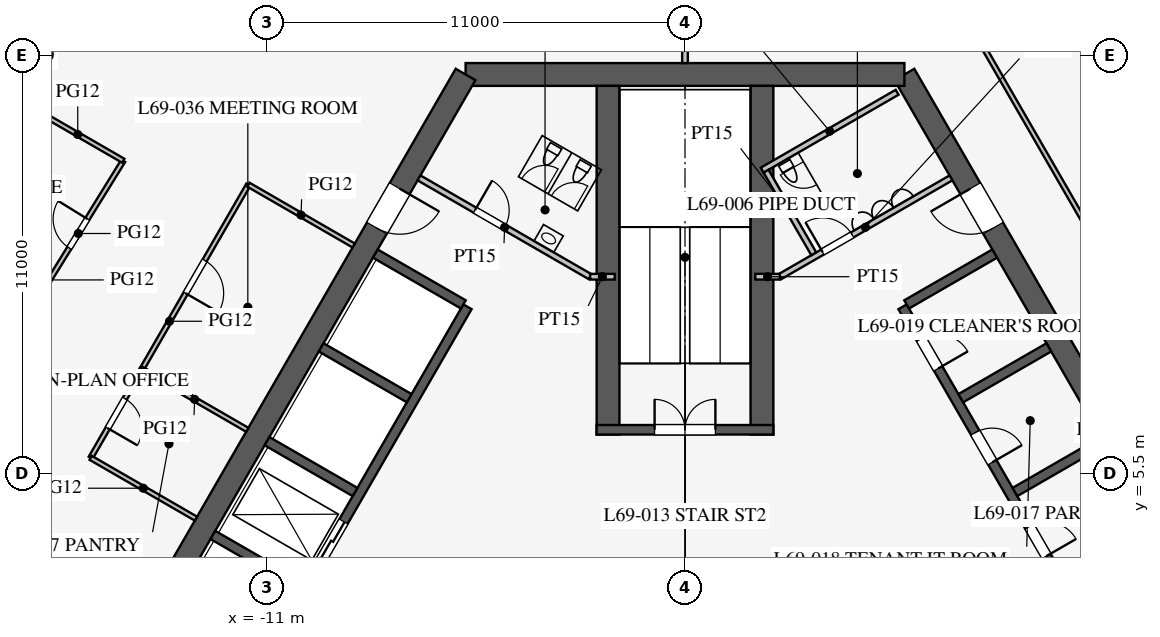
"""IFC4 building model, lengths in metres.
Left out: names, types, materials, properties, quantities, classifications, styles, units other than length and angle.
Written with IfcOpenShell. Run it as: python <this file> out.ifc"""

import sys

from ifc_helpers import new_model, si_unit, direction, frame, frame_2d, origin, place, context, subcontext, project, spatial, rectangle, extrude, element, fill, save


model = new_model("IFC4")
c1 = context("Model", 3, precision=1e-05, world=origin(), true_north=direction((0.0, 1.0)))
c2 = subcontext(c1, "Body", "Model", "MODEL_VIEW")
j1 = project(units=[si_unit("LENGTHUNIT", "METRE"), si_unit("PLANEANGLEUNIT", "RADIAN")], contexts=[c1])
p1 = place(None, origin())
s1 = spatial("IfcSite", under=j1, at=p1, CompositionType="ELEMENT")
p2 = place(p1, origin())
s2 = spatial("IfcBuilding", under=s1, at=p2, CompositionType="ELEMENT")
p3 = place(p2, frame((0.0, 0.0, 301.5)))
s3 = spatial("IfcBuildingStorey", under=s2, at=p3, CompositionType="ELEMENT", Elevation=301.5)
p4 = place(p3, frame((16.743, -3.0, 0.0), z_axis=(0.0, 0.0, 1.0), x_axis=(-0.500002442456, 0.866023993627, 0.0)))
e1 = element("IfcWall", 1, at=p4, inside=s3, PredefinedType="SHEAR", context=c2, shape_type="SweptSolid", body=[
    extrude(rectangle(XDim=21.939, YDim=0.6, at=frame_2d((10.97, 0.0))), origin(), (0.0, 0.0, 1.0), 4.2),
])
p5 = place(p4, frame((17.27, 0.0, 0.0)))
e2 = element("IfcOpeningElement", 2, at=p5, cuts=e1, PredefinedType="OPENING", context=c2, shape_type="SweptSolid", body=[
    extrude(rectangle(XDim=1.2, YDim=2.1, at=frame_2d((0.6, 1.05))), frame((0.0, 0.31, 0.0), z_axis=(0.0, -1.0, 0.0), x_axis=(1.0, 0.0, 0.0)), (0.0, 0.0, 1.0), 0.62),
])
p6 = place(p4, frame((3.47, 0.0, 0.0)))
e3 = element("IfcOpeningElement", 3, at=p6, cuts=e1, PredefinedType="OPENING", context=c2, shape_type="SweptSolid", body=[
    extrude(rectangle(XDim=1.2, YDim=2.1, at=frame_2d((0.6, 1.05))), frame((0.0, 0.31, 0.0), z_axis=(0.0, -1.0, 0.0), x_axis=(1.0, 0.0, 0.0)), (0.0, 0.0, 1.0), 0.62),
])
p7 = place(p3, frame((5.773, 16.0, 0.0), z_axis=(0.0, 0.0, 1.0), x_axis=(-1.0, 0.0, 0.0)))
e4 = element("IfcWall", 4, at=p7, inside=s3, PredefinedType="SHEAR", context=c2, shape_type="SweptSolid", body=[
    extrude(rectangle(XDim=11.547, YDim=0.6, at=frame_2d((5.773, 0.0))), origin(), (0.0, 0.0, 1.0), 4.2),
])
p8 = place(p3, frame((-5.773, 16.0, 0.0), z_axis=(0.0, 0.0, 1.0), x_axis=(-0.500002442456, -0.866023993627, 0.0)))
e5 = element("IfcWall", 5, at=p8, inside=s3, PredefinedType="SHEAR", context=c2, shape_type="SweptSolid", body=[
    extrude(rectangle(XDim=21.939, YDim=0.6, at=frame_2d((10.97, 0.0))), origin(), (0.0, 0.0, 1.0), 4.2),
])
p9 = place(p8, frame((17.27, 0.0, 0.0)))
e6 = element("IfcOpeningElement", 6, at=p9, cuts=e5, PredefinedType="OPENING", context=c2, shape_type="SweptSolid", body=[
    extrude(rectangle(XDim=1.2, YDim=2.1, at=frame_2d((0.6, 1.05))), frame((0.0, 0.31, 0.0), z_axis=(0.0, -1.0, 0.0), x_axis=(1.0, 0.0, 0.0)), (0.0, 0.0, 1.0), 0.62),
])
p10 = place(p8, frame((3.47, 0.0, 0.0)))
e7 = element("IfcOpeningElement", 7, at=p10, cuts=e5, PredefinedType="OPENING", context=c2, shape_type="SweptSolid", body=[
    extrude(rectangle(XDim=1.2, YDim=2.1, at=frame_2d((0.6, 1.05))), frame((0.0, 0.31, 0.0), z_axis=(0.0, -1.0, 0.0), x_axis=(1.0, 0.0, 0.0)), (0.0, 0.0, 1.0), 0.62),
])
p11 = place(p3, frame((11.424, 0.014, 0.0), z_axis=(0.0, 0.0, 1.0), x_axis=(-0.500001763848, 0.866024385424, 0.0)))
e8 = element("IfcWall", 8, at=p11, inside=s3, PredefinedType="SHEAR", context=c2, shape_type="SweptSolid", body=[
    extrude(rectangle(XDim=11.4, YDim=0.25, at=frame_2d((5.7, 0.0))), origin(), (0.0, 0.0, 1.0), 4.2),
])
p12 = place(p11, frame((0.975, 0.0, 0.0)))
e9 = element("IfcOpeningElement", 9, at=p12, cuts=e8, PredefinedType="OPENING", context=c2, shape_type="SweptSolid", body=[
    extrude(rectangle(XDim=0.9, YDim=2.1, at=frame_2d((0.45, 1.05))), frame((0.0, 0.135, 0.0), z_axis=(0.0, -1.0, 0.0), x_axis=(1.0, 0.0, 0.0)), (0.0, 0.0, 1.0), 0.27),
])
p13 = place(p11, frame((3.825, 0.0, 0.0)))
e10 = element("IfcOpeningElement", 10, at=p13, cuts=e8, PredefinedType="OPENING", context=c2, shape_type="SweptSolid", body=[
    extrude(rectangle(XDim=0.9, YDim=2.1, at=frame_2d((0.45, 1.05))), frame((0.0, 0.135, 0.0), z_axis=(0.0, -1.0, 0.0), x_axis=(1.0, 0.0, 0.0)), (0.0, 0.0, 1.0), 0.27),
])
p14 = place(p11, frame((6.675, 0.0, 0.0)))
e11 = element("IfcOpeningElement", 11, at=p14, cuts=e8, PredefinedType="OPENING", context=c2, shape_type="SweptSolid", body=[
    extrude(rectangle(XDim=0.9, YDim=2.1, at=frame_2d((0.45, 1.05))), frame((0.0, 0.135, 0.0), z_axis=(0.0, -1.0, 0.0), x_axis=(1.0, 0.0, 0.0)), (0.0, 0.0, 1.0), 0.27),
])
p15 = place(p11, frame((9.525, 0.0, 0.0)))
e12 = element("IfcOpeningElement", 12, at=p15, cuts=e8, PredefinedType="OPENING", context=c2, shape_type="SweptSolid", body=[
    extrude(rectangle(XDim=0.9, YDim=2.1, at=frame_2d((0.45, 1.05))), frame((0.0, 0.135, 0.0), z_axis=(0.0, -1.0, 0.0), x_axis=(1.0, 0.0, 0.0)), (0.0, 0.0, 1.0), 0.27),
])
for number, where, z_axis, x_axis in (
    (13, (10.107, 2.544, 0.0), (0.0, 0.0, 1.0), (0.866, 0.5, 0.0)),
    (14, (8.682, 5.012, 0.0), (0.0, 0.0, 1.0), (0.866, 0.5, 0.0)),
    (15, (7.257, 7.481, 0.0), (0.0, 0.0, 1.0), (0.866, 0.5, 0.0)),
    (16, (5.832, 9.949, 0.0), (0.0, 0.0, 1.0), (0.866, 0.5, 0.0)),
):
    element("IfcWall", number, at=place(p3, frame(where, z_axis=z_axis, x_axis=x_axis)), inside=s3, PredefinedType="SHEAR", context=c2, shape_type="SweptSolid", body=[
        extrude(rectangle(XDim=2.675, YDim=0.25, at=frame_2d((1.337, 0.0))), origin(), (0.0, 0.0, 1.0), 4.2),
    ])
p16 = place(p3, frame((-5.724, 9.886, 0.0), z_axis=(0.0, 0.0, 1.0), x_axis=(-0.500001763848, -0.866024385424, 0.0)))
e17 = element("IfcWall", 17, at=p16, inside=s3, PredefinedType="SHEAR", context=c2, shape_type="SweptSolid", body=[
    extrude(rectangle(XDim=11.4, YDim=0.25, at=frame_2d((5.7, 0.0))), origin(), (0.0, 0.0, 1.0), 4.2),
])
p17 = place(p16, frame((6.525, 0.0, 0.0)))
e18 = element("IfcOpeningElement", 18, at=p17, cuts=e17, PredefinedType="OPENING", context=c2, shape_type="SweptSolid", body=[
    extrude(rectangle(XDim=1.2, YDim=2.2, at=frame_2d((0.6, 1.1))), frame((0.0, 0.135, 0.0), z_axis=(0.0, -1.0, 0.0), x_axis=(1.0, 0.0, 0.0)), (0.0, 0.0, 1.0), 0.27),
])
p18 = place(p16, frame((9.375, 0.0, 0.0)))
e19 = element("IfcOpeningElement", 19, at=p18, cuts=e17, PredefinedType="OPENING", context=c2, shape_type="SweptSolid", body=[
    extrude(rectangle(XDim=1.2, YDim=2.2, at=frame_2d((0.6, 1.1))), frame((0.0, 0.135, 0.0), z_axis=(0.0, -1.0, 0.0), x_axis=(1.0, 0.0, 0.0)), (0.0, 0.0, 1.0), 0.27),
])
for number, where, z_axis, x_axis in (
    (20, (-5.832, 9.949, 0.0), (0.0, 0.0, 1.0), (-0.866, 0.5, 0.0)),
    (21, (-7.257, 7.481, 0.0), (0.0, 0.0, 1.0), (-0.866, 0.5, 0.0)),
    (22, (-8.682, 5.012, 0.0), (0.0, 0.0, 1.0), (-0.866, 0.5, 0.0)),
    (23, (-10.107, 2.544, 0.0), (0.0, 0.0, 1.0), (-0.866, 0.5, 0.0)),
):
    element("IfcWall", number, at=place(p3, frame(where, z_axis=z_axis, x_axis=x_axis)), inside=s3, PredefinedType="SHEAR", context=c2, shape_type="SweptSolid", body=[
        extrude(rectangle(XDim=2.675, YDim=0.25, at=frame_2d((1.337, 0.0))), origin(), (0.0, 0.0, 1.0), 4.2),
    ])
for number, where, z_axis, x_axis in (
    (24, (2.025, 6.525, 0.0), (0.0, 0.0, 1.0), (0.0, 1.0, 0.0)),
    (25, (-2.025, 6.525, 0.0), (0.0, 0.0, 1.0), (0.0, 1.0, 0.0)),
):
    element("IfcWall", number, at=place(p3, frame(where, z_axis=z_axis, x_axis=x_axis)), inside=s3, PredefinedType="SHEAR", context=c2, shape_type="SweptSolid", body=[
        extrude(rectangle(XDim=9.175, YDim=0.6, at=frame_2d((4.587, 0.0))), origin(), (0.0, 0.0, 1.0), 4.2),
    ])
p19 = place(p3, frame((2.325, 6.65, 0.0), z_axis=(0.0, 0.0, 1.0), x_axis=(-1.0, 0.0, 0.0)))
e26 = element("IfcWall", 26, at=p19, inside=s3, PredefinedType="SHEAR", context=c2, shape_type="SweptSolid", body=[
    extrude(rectangle(XDim=4.65, YDim=0.25, at=frame_2d((2.325, 0.0))), origin(), (0.0, 0.0, 1.0), 4.2),
])
p20 = place(p19, frame((1.525, 0.0, 0.0)))
e27 = element("IfcOpeningElement", 27, at=p20, cuts=e26, PredefinedType="OPENING", context=c2, shape_type="SweptSolid", body=[
    extrude(rectangle(XDim=1.6, YDim=2.1, at=frame_2d((0.8, 1.05))), frame((0.0, 0.135, 0.0), z_axis=(0.0, -1.0, 0.0), x_axis=(1.0, 0.0, 0.0)), (0.0, 0.0, 1.0), 0.27),
])
p21 = place(p3, frame((2.495, 10.678, 0.0), z_axis=(0.0, 0.0, 1.0), x_axis=(0.866021400173, 0.500006934395, 0.0)))
e28 = element("IfcWall", 28, at=p21, inside=s3, PredefinedType="PARTITIONING", context=c2, shape_type="SweptSolid", body=[
    extrude(rectangle(XDim=5.2, YDim=0.15, at=frame_2d((2.6, 0.0))), origin(), (0.0, 0.0, 1.0), 4.0),
])
p22 = place(p21, frame((1.3, 0.0, 0.0)))
e29 = element("IfcOpeningElement", 29, at=p22, cuts=e28, PredefinedType="OPENING", context=c2, shape_type="SweptSolid", body=[
    extrude(rectangle(XDim=0.9, YDim=2.1, at=frame_2d((0.45, 1.05))), frame((0.0, 0.085, 0.0), z_axis=(0.0, -1.0, 0.0), x_axis=(1.0, 0.0, 0.0)), (0.0, 0.0, 1.0), 0.17),
])
p23 = place(p3, frame((-2.495, 10.678, 0.0), z_axis=(0.0, 0.0, 1.0), x_axis=(-0.866021400173, 0.500006934395, 0.0)))
e30 = element("IfcWall", 30, at=p23, inside=s3, PredefinedType="PARTITIONING", context=c2, shape_type="SweptSolid", body=[
    extrude(rectangle(XDim=5.2, YDim=0.15, at=frame_2d((2.6, 0.0))), origin(), (0.0, 0.0, 1.0), 4.0),
])
p24 = place(p23, frame((2.6, 0.0, 0.0)))
e31 = element("IfcOpeningElement", 31, at=p24, cuts=e30, PredefinedType="OPENING", context=c2, shape_type="SweptSolid", body=[
    extrude(rectangle(XDim=0.9, YDim=2.1, at=frame_2d((0.45, 1.05))), frame((0.0, 0.085, 0.0), z_axis=(0.0, -1.0, 0.0), x_axis=(1.0, 0.0, 0.0)), (0.0, 0.0, 1.0), 0.17),
])
for number, where, z_axis, x_axis in (
    (32, (2.495, 10.678, 0.0), (0.0, 0.0, 1.0), (-1.0, 0.0, 0.0)),
    (33, (-2.495, 10.678, 0.0), (0.0, 0.0, 1.0), (1.0, 0.0, 0.0)),
):
    element("IfcWall", number, at=place(p3, frame(where, z_axis=z_axis, x_axis=x_axis)), inside=s3, PredefinedType="PARTITIONING", context=c2, shape_type="SweptSolid", body=[
        extrude(rectangle(XDim=0.645, YDim=0.15, at=frame_2d((0.323, 0.0))), origin(), (0.0, 0.0, 1.0), 4.0),
    ])
p25 = place(p3, frame((2.031, 13.482, 0.0), z_axis=(0.0, 0.0, 1.0), x_axis=(0.866050731258, 0.499956128963, 0.0)))
e34 = element("IfcWall", 34, at=p25, inside=s3, PredefinedType="PARTITIONING", context=c2, shape_type="SweptSolid", body=[
    extrude(rectangle(XDim=4.1, YDim=0.15, at=frame_2d((2.05, 0.0))), origin(), (0.0, 0.0, 1.0), 4.0),
])
p26 = place(p3, frame((3.389, 11.281, 0.0), z_axis=(0.0, 0.0, 1.0), x_axis=(-0.499989096993, 0.866031698547, 0.0)))
e35 = element("IfcWall", 35, at=p26, inside=s3, PredefinedType="PARTITIONING", context=c2, shape_type="SweptSolid", body=[
    extrude(rectangle(XDim=2.51, YDim=0.15, at=frame_2d((1.255, 0.0))), origin(), (0.0, 0.0, 1.0), 4.0),
])
p27 = place(p3, frame((0.0, 16.3, 0.0), z_axis=(0.0, 0.0, 1.0), x_axis=(0.0, 1.0, 0.0)))
e36 = element("IfcWall", 36, at=p27, inside=s3, PredefinedType="PARTITIONING", context=c2, shape_type="SweptSolid", body=[
    extrude(rectangle(XDim=13.45, YDim=0.15, at=frame_2d((6.725, 0.0))), origin(), (0.0, 0.0, 1.0), 2.5),
])
p28 = place(p3, frame((25.968, -14.657, 0.0), z_axis=(0.0, 0.0, 1.0), x_axis=(-0.500000361757, 0.866025194924, 0.0)))
e37 = element("IfcWall", 37, at=p28, inside=s3, PredefinedType="PARTITIONING", context=c2, shape_type="SweptSolid", body=[
    extrude(rectangle(XDim=51.355, YDim=0.12, at=frame_2d((25.678, 0.0))), origin(), (0.0, 0.0, 1.0), 2.9),
])
p29 = place(p28, frame((9.9, 0.0, 0.15)))
e38 = element("IfcOpeningElement", 38, at=p29, cuts=e37, PredefinedType="OPENING", context=c2, shape_type="SweptSolid", body=[
    extrude(rectangle(XDim=1.8, YDim=2.1, at=frame_2d((0.9, 1.05))), frame((0.0, 0.07, 0.0), z_axis=(0.0, -1.0, 0.0), x_axis=(1.0, 0.0, 0.0)), (0.0, 0.0, 1.0), 0.14),
])
p30 = place(p28, frame((39.65, 0.0, 0.15)))
e39 = element("IfcOpeningElement", 39, at=p30, cuts=e37, PredefinedType="OPENING", context=c2, shape_type="SweptSolid", body=[
    extrude(rectangle(XDim=1.8, YDim=2.1, at=frame_2d((0.9, 1.05))), frame((0.0, 0.07, 0.0), z_axis=(0.0, -1.0, 0.0), x_axis=(1.0, 0.0, 0.0)), (0.0, 0.0, 1.0), 0.14),
])
p31 = place(p3, frame((-14.289, 8.25, 0.0), z_axis=(0.0, 0.0, 1.0), x_axis=(-0.50000943426, -0.866019956843, 0.0)))
e40 = element("IfcWall", 40, at=p31, inside=s3, PredefinedType="PARTITIONING", context=c2, shape_type="SweptSolid", body=[
    extrude(rectangle(XDim=2.7, YDim=0.12, at=frame_2d((1.35, 0.0))), origin(), (0.0, 0.0, 1.0), 2.9),
])
p32 = place(p31, frame((0.9, 0.0, 0.15)))
e41 = element("IfcOpeningElement", 41, at=p32, cuts=e40, PredefinedType="OPENING", context=c2, shape_type="SweptSolid", body=[
    extrude(rectangle(XDim=0.9, YDim=2.1, at=frame_2d((0.45, 1.05))), frame((0.0, 0.07, 0.0), z_axis=(0.0, -1.0, 0.0), x_axis=(1.0, 0.0, 0.0)), (0.0, 0.0, 1.0), 0.14),
])
p33 = place(p3, frame((-11.49, 13.1, 0.0), z_axis=(0.0, 0.0, 1.0), x_axis=(-0.499965239061, -0.866045472092, 0.0)))
e42 = element("IfcWall", 42, at=p33, inside=s3, PredefinedType="PARTITIONING", context=c2, shape_type="SweptSolid", body=[
    extrude(rectangle(XDim=5.6, YDim=0.12, at=frame_2d((2.8, 0.0))), origin(), (0.0, 0.0, 1.0), 2.9),
])
p34 = place(p33, frame((2.3, 0.0, 0.15)))
e43 = element("IfcOpeningElement", 43, at=p34, cuts=e42, PredefinedType="OPENING", context=c2, shape_type="SweptSolid", body=[
    extrude(rectangle(XDim=1.0, YDim=2.1, at=frame_2d((0.5, 1.05))), frame((0.0, 0.07, 0.0), z_axis=(0.0, -1.0, 0.0), x_axis=(1.0, 0.0, 0.0)), (0.0, 0.0, 1.0), 0.14),
])
for number, where, z_axis, x_axis in (
    (44, (-12.868, 4.312, 0.0), (0.0, 0.0, 1.0), (-0.866, 0.5, 0.0)),
    (45, (-11.518, 6.65, 0.0), (0.0, 0.0, 1.0), (-0.866, 0.5, 0.0)),
):
    element("IfcWall", number, at=place(p3, frame(where, z_axis=z_axis, x_axis=x_axis)), inside=s3, PredefinedType="PARTITIONING", context=c2, shape_type="SweptSolid", body=[
        extrude(rectangle(XDim=3.2, YDim=0.12, at=frame_2d((1.6, 0.0))), origin(), (0.0, 0.0, 1.0), 2.9),
    ])
p35 = place(p3, frame((-8.718, 11.5, 0.0), z_axis=(0.0, 0.0, 1.0), x_axis=(-0.866028054938, 0.499995408039, 0.0)))
e46 = element("IfcWall", 46, at=p35, inside=s3, PredefinedType="PARTITIONING", context=c2, shape_type="SweptSolid", body=[
    extrude(rectangle(XDim=3.2, YDim=0.12, at=frame_2d((1.6, 0.0))), origin(), (0.0, 0.0, 1.0), 2.9),
])
p36 = place(p3, frame((-14.781, 13.73, 0.0), z_axis=(0.0, 0.0, 1.0), x_axis=(-0.525981173851, -0.850496210899, 0.0)))
e47 = element("IfcWall", 47, at=p36, inside=s3, PredefinedType="PARTITIONING", context=c2, shape_type="SweptSolid", body=[
    extrude(rectangle(XDim=4.502, YDim=0.12, at=frame_2d((2.251, 0.0))), origin(), (0.0, 0.0, 1.0), 2.9),
])
p37 = place(p36, frame((1.8, 0.0, 0.15)))
e48 = element("IfcOpeningElement", 48, at=p37, cuts=e47, PredefinedType="OPENING", context=c2, shape_type="SweptSolid", body=[
    extrude(rectangle(XDim=0.9, YDim=2.1, at=frame_2d((0.45, 1.05))), frame((0.0, 0.07, 0.0), z_axis=(0.0, -1.0, 0.0), x_axis=(1.0, 0.0, 0.0)), (0.0, 0.0, 1.0), 0.14),
])
p38 = place(p3, frame((-14.781, 13.73, 0.0), z_axis=(0.0, 0.0, 1.0), x_axis=(-0.866019581949, 0.500010083578, 0.0)))
e49 = element("IfcWall", 49, at=p38, inside=s3, PredefinedType="PARTITIONING", context=c2, shape_type="SweptSolid", body=[
    extrude(rectangle(XDim=2.768, YDim=0.12, at=frame_2d((1.384, 0.0))), origin(), (0.0, 0.0, 1.0), 2.9),
])
p39 = place(p22, origin())
e50 = element("IfcDoor", 50, at=p39, inside=s3, OperationType="SINGLE_SWING_LEFT", PredefinedType="DOOR", context=c2, shape_type="SweptSolid", body=[
    extrude(rectangle(XDim=0.9, YDim=2.1, at=frame_2d((0.45, 1.05))), frame((0.0, 0.025, 0.0), z_axis=(0.0, -1.0, 0.0), x_axis=(1.0, 0.0, 0.0)), (0.0, 0.0, 1.0), 0.05),
])
fill(e29, e50)
p40 = place(p24, frame((0.9, 0.0, 0.0), z_axis=(0.0, 0.0, 1.0), x_axis=(-1.0, 0.0, 0.0)))
e51 = element("IfcDoor", 51, at=p40, inside=s3, OperationType="SINGLE_SWING_LEFT", PredefinedType="DOOR", context=c2, shape_type="SweptSolid", body=[
    extrude(rectangle(XDim=0.9, YDim=2.1, at=frame_2d((0.45, 1.05))), frame((0.0, 0.025, 0.0), z_axis=(0.0, -1.0, 0.0), x_axis=(1.0, 0.0, 0.0)), (0.0, 0.0, 1.0), 0.05),
])
fill(e31, e51)
p41 = place(p20, frame((1.6, 0.0, 0.0), z_axis=(0.0, 0.0, 1.0), x_axis=(-1.0, 0.0, 0.0)))
e52 = element("IfcDoor", 52, at=p41, inside=s3, OperationType="DOUBLE_DOOR_SINGLE_SWING", PredefinedType="DOOR", context=c2, shape_type="SweptSolid", body=[
    extrude(rectangle(XDim=1.6, YDim=2.1, at=frame_2d((0.8, 1.05))), frame((0.0, 0.025, 0.0), z_axis=(0.0, -1.0, 0.0), x_axis=(1.0, 0.0, 0.0)), (0.0, 0.0, 1.0), 0.05),
])
fill(e27, e52)
p42 = place(p5, origin())
e53 = element("IfcDoor", 53, at=p42, inside=s3, OperationType="SINGLE_SWING_RIGHT", PredefinedType="DOOR", context=c2, shape_type="SweptSolid", body=[
    extrude(rectangle(XDim=1.2, YDim=2.1, at=frame_2d((0.6, 1.05))), frame((0.0, 0.025, 0.0), z_axis=(0.0, -1.0, 0.0), x_axis=(1.0, 0.0, 0.0)), (0.0, 0.0, 1.0), 0.05),
])
fill(e2, e53)
p43 = place(p10, origin())
e54 = element("IfcDoor", 54, at=p43, inside=s3, OperationType="SINGLE_SWING_LEFT", PredefinedType="DOOR", context=c2, shape_type="SweptSolid", body=[
    extrude(rectangle(XDim=1.2, YDim=2.1, at=frame_2d((0.6, 1.05))), frame((0.0, 0.025, 0.0), z_axis=(0.0, -1.0, 0.0), x_axis=(1.0, 0.0, 0.0)), (0.0, 0.0, 1.0), 0.05),
])
fill(e7, e54)
p44 = place(p13, frame((0.9, 0.0, 0.0), z_axis=(0.0, 0.0, 1.0), x_axis=(-1.0, 0.0, 0.0)))
e55 = element("IfcDoor", 55, at=p44, inside=s3, OperationType="SINGLE_SWING_RIGHT", PredefinedType="DOOR", context=c2, shape_type="SweptSolid", body=[
    extrude(rectangle(XDim=0.9, YDim=2.1, at=frame_2d((0.45, 1.05))), frame((0.0, 0.025, 0.0), z_axis=(0.0, -1.0, 0.0), x_axis=(1.0, 0.0, 0.0)), (0.0, 0.0, 1.0), 0.05),
])
fill(e10, e55)
p45 = place(p14, frame((0.9, 0.0, 0.0), z_axis=(0.0, 0.0, 1.0), x_axis=(-1.0, 0.0, 0.0)))
e56 = element("IfcDoor", 56, at=p45, inside=s3, OperationType="SINGLE_SWING_RIGHT", PredefinedType="DOOR", context=c2, shape_type="SweptSolid", body=[
    extrude(rectangle(XDim=0.9, YDim=2.1, at=frame_2d((0.45, 1.05))), frame((0.0, 0.025, 0.0), z_axis=(0.0, -1.0, 0.0), x_axis=(1.0, 0.0, 0.0)), (0.0, 0.0, 1.0), 0.05),
])
fill(e11, e56)
p46 = place(p15, frame((0.9, 0.0, 0.0), z_axis=(0.0, 0.0, 1.0), x_axis=(-1.0, 0.0, 0.0)))
e57 = element("IfcDoor", 57, at=p46, inside=s3, OperationType="SINGLE_SWING_RIGHT", PredefinedType="DOOR", context=c2, shape_type="SweptSolid", body=[
    extrude(rectangle(XDim=0.9, YDim=2.1, at=frame_2d((0.45, 1.05))), frame((0.0, 0.025, 0.0), z_axis=(0.0, -1.0, 0.0), x_axis=(1.0, 0.0, 0.0)), (0.0, 0.0, 1.0), 0.05),
])
fill(e12, e57)
p47 = place(p34, origin())
e58 = element("IfcDoor", 58, at=p47, inside=s3, OperationType="SINGLE_SWING_RIGHT", PredefinedType="DOOR", context=c2, shape_type="SweptSolid", body=[
    extrude(rectangle(XDim=1.0, YDim=2.1, at=frame_2d((0.5, 1.05))), frame((0.0, 0.025, 0.0), z_axis=(0.0, -1.0, 0.0), x_axis=(1.0, 0.0, 0.0)), (0.0, 0.0, 1.0), 0.05),
])
fill(e43, e58)
p48 = place(p32, origin())
e59 = element("IfcDoor", 59, at=p48, inside=s3, OperationType="SINGLE_SWING_RIGHT", PredefinedType="DOOR", context=c2, shape_type="SweptSolid", body=[
    extrude(rectangle(XDim=0.9, YDim=2.1, at=frame_2d((0.45, 1.05))), frame((0.0, 0.025, 0.0), z_axis=(0.0, -1.0, 0.0), x_axis=(1.0, 0.0, 0.0)), (0.0, 0.0, 1.0), 0.05),
])
fill(e41, e59)
p49 = place(p37, frame((0.9, 0.0, 0.0), z_axis=(0.0, 0.0, 1.0), x_axis=(-1.0, 0.0, 0.0)))
e60 = element("IfcDoor", 60, at=p49, inside=s3, OperationType="SINGLE_SWING_RIGHT", PredefinedType="DOOR", context=c2, shape_type="SweptSolid", body=[
    extrude(rectangle(XDim=0.9, YDim=2.1, at=frame_2d((0.45, 1.05))), frame((0.0, 0.025, 0.0), z_axis=(0.0, -1.0, 0.0), x_axis=(1.0, 0.0, 0.0)), (0.0, 0.0, 1.0), 0.05),
])
fill(e48, e60)
p50 = place(p17, origin())
e61 = element("IfcDoor", 61, at=p50, inside=s3, OperationType="DOUBLE_DOOR_SLIDING", PredefinedType="DOOR", context=c2, shape_type="SweptSolid", body=[
    extrude(rectangle(XDim=1.2, YDim=2.2, at=frame_2d((0.6, 1.1))), frame((0.0, 0.025, 0.0), z_axis=(0.0, -1.0, 0.0), x_axis=(1.0, 0.0, 0.0)), (0.0, 0.0, 1.0), 0.05),
])
fill(e18, e61)
save(model, sys.argv[1])
